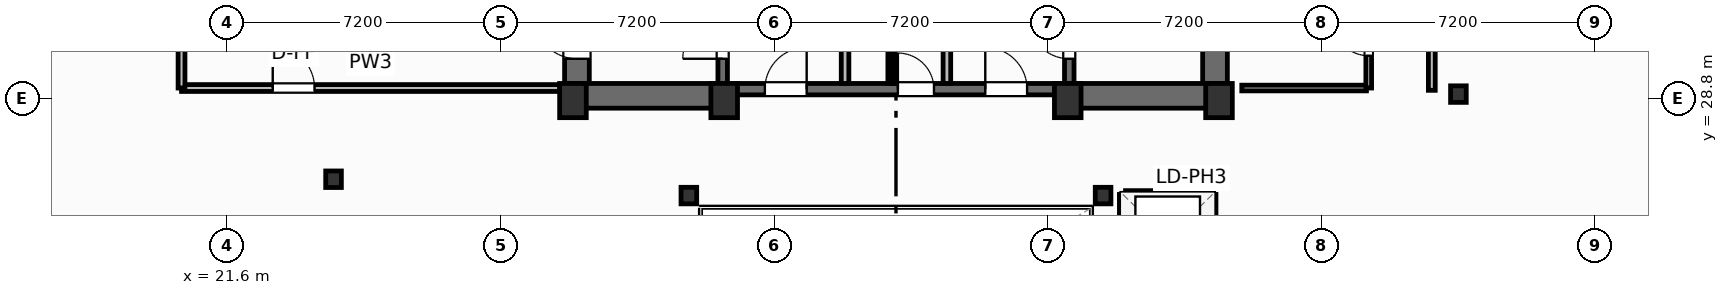
"""IFC4 building model, lengths in metres.
Left out: names, types, materials, properties, quantities, classifications, styles, units other than length and angle.
Written with IfcOpenShell. Run it as: python <this file> out.ifc"""

import sys

from ifc_helpers import new_model, si_unit, direction, frame, frame_2d, origin, origin_2d, place, context, subcontext, project, spatial, rectangle, i_section, extrude, element, fill, save


model = new_model("IFC4")
c1 = context("Model", 3, precision=1e-05, world=origin(), true_north=direction((0.0, 1.0)))
c2 = subcontext(c1, "Body", "Model", "MODEL_VIEW")
j1 = project(units=[si_unit("LENGTHUNIT", "METRE"), si_unit("PLANEANGLEUNIT", "RADIAN")], contexts=[c1])
p1 = place(None, origin())
s1 = spatial("IfcSite", under=j1, at=p1, CompositionType="ELEMENT")
p2 = place(p1, origin())
s2 = spatial("IfcBuilding", under=s1, at=p2, CompositionType="ELEMENT")
p3 = place(p2, frame((0.0, 0.0, 253.4)))
s3 = spatial("IfcBuildingStorey", under=s2, at=p3, CompositionType="ELEMENT", Elevation=253.4)
for number, where, z_axis, x_axis in (
    (1, (30.7, 28.75, 0.0), (0.0, 0.0, 1.0), (1.0, 0.0, 0.0)),
    (2, (34.68, 28.75, 0.0), (0.0, 0.0, 1.0), (1.0, 0.0, 0.0)),
    (3, (43.72, 28.75, 0.0), (0.0, 0.0, 1.0), (1.0, 0.0, 0.0)),
    (4, (47.7, 28.75, 0.0), (0.0, 0.0, 1.0), (1.0, 0.0, 0.0)),
):
    element("IfcColumn", number, at=place(p3, frame(where, z_axis=z_axis, x_axis=x_axis)), inside=s3, PredefinedType="COLUMN", context=c2, shape_type="SweptSolid", body=[
        extrude(rectangle(XDim=0.7, YDim=0.9, at=origin_2d()), origin(), (0.0, 0.0, 1.0), 4.8),
    ])
for number, where, z_axis, x_axis in (
    (5, (33.75, 26.25, 0.0), (0.0, 0.0, 1.0), (1.0, 0.0, 0.0)),
    (6, (44.65, 26.25, 0.0), (0.0, 0.0, 1.0), (1.0, 0.0, 0.0)),
    (7, (24.4, 26.68, 0.0), (0.0, 0.0, 1.0), (1.0, 0.0, 0.0)),
    (8, (54.0, 28.92, 0.0), (0.0, 0.0, 1.0), (1.0, 0.0, 0.0)),
):
    element("IfcColumn", number, at=place(p3, frame(where, z_axis=z_axis, x_axis=x_axis)), inside=s3, PredefinedType="COLUMN", context=c2, shape_type="SweptSolid", body=[
        extrude(i_section(OverallWidth=0.412, OverallDepth=0.435, WebThickness=0.036, FlangeThickness=0.057, FilletRadius=0.025, at=origin_2d()), origin(), (0.0, 0.0, 1.0), 4.8),
    ])
p4 = place(p3, frame((30.805, 29.2, 0.0), z_axis=(0.0, 0.0, 1.0), x_axis=(0.0, 1.0, 0.0)))
e9 = element("IfcWall", 9, at=p4, inside=s3, PredefinedType="SHEAR", context=c2, shape_type="SweptSolid", body=[
    extrude(rectangle(XDim=9.22, YDim=0.65, at=frame_2d((4.61, 0.0))), origin(), (0.0, 0.0, 1.0), 4.55),
])
p5 = place(p4, frame((0.65, 0.0, 0.0)))
e10 = element("IfcOpeningElement", 10, at=p5, cuts=e9, PredefinedType="OPENING", context=c2, shape_type="SweptSolid", body=[
    extrude(rectangle(XDim=1.1, YDim=2.15, at=frame_2d((0.55, 1.075))), frame((0.0, 0.335, 0.0), z_axis=(0.0, -1.0, 0.0), x_axis=(1.0, 0.0, 0.0)), (0.0, 0.0, 1.0), 0.67),
])
p6 = place(p3, frame((47.595, 29.2, 0.0), z_axis=(0.0, 0.0, 1.0), x_axis=(0.0, 1.0, 0.0)))
e11 = element("IfcWall", 11, at=p6, inside=s3, PredefinedType="SHEAR", context=c2, shape_type="SweptSolid", body=[
    extrude(rectangle(XDim=9.22, YDim=0.65, at=frame_2d((4.61, 0.0))), origin(), (0.0, 0.0, 1.0), 4.55),
])
p7 = place(p3, frame((30.48, 28.875, 0.0), z_axis=(0.0, 0.0, 1.0), x_axis=(1.0, 0.0, 0.0)))
e12 = element("IfcWall", 12, at=p7, inside=s3, PredefinedType="SHEAR", context=c2, shape_type="SweptSolid", body=[
    extrude(rectangle(XDim=4.32, YDim=0.65, at=frame_2d((2.16, 0.0))), origin(), (0.0, 0.0, 1.0), 4.55),
])
p8 = place(p3, frame((43.6, 28.875, 0.0), z_axis=(0.0, 0.0, 1.0), x_axis=(1.0, 0.0, 0.0)))
e13 = element("IfcWall", 13, at=p8, inside=s3, PredefinedType="SHEAR", context=c2, shape_type="SweptSolid", body=[
    extrude(rectangle(XDim=4.32, YDim=0.65, at=frame_2d((2.16, 0.0))), origin(), (0.0, 0.0, 1.0), 4.55),
])
p9 = place(p3, frame((34.8, 29.05, 0.0), z_axis=(0.0, 0.0, 1.0), x_axis=(1.0, 0.0, 0.0)))
e14 = element("IfcWall", 14, at=p9, inside=s3, PredefinedType="SHEAR", context=c2, shape_type="SweptSolid", body=[
    extrude(rectangle(XDim=8.8, YDim=0.3, at=frame_2d((4.4, 0.0))), origin(), (0.0, 0.0, 1.0), 4.55),
])
p10 = place(p9, frame((0.95, 0.0, 0.0)))
e15 = element("IfcOpeningElement", 15, at=p10, cuts=e14, PredefinedType="OPENING", context=c2, shape_type="SweptSolid", body=[
    extrude(rectangle(XDim=1.1, YDim=2.15, at=frame_2d((0.55, 1.075))), frame((0.0, 0.16, 0.0), z_axis=(0.0, -1.0, 0.0), x_axis=(1.0, 0.0, 0.0)), (0.0, 0.0, 1.0), 0.32),
])
p11 = place(p9, frame((6.75, 0.0, 0.0)))
e16 = element("IfcOpeningElement", 16, at=p11, cuts=e14, PredefinedType="OPENING", context=c2, shape_type="SweptSolid", body=[
    extrude(rectangle(XDim=1.1, YDim=2.15, at=frame_2d((0.55, 1.075))), frame((0.0, 0.16, 0.0), z_axis=(0.0, -1.0, 0.0), x_axis=(1.0, 0.0, 0.0)), (0.0, 0.0, 1.0), 0.32),
])
p12 = place(p9, frame((4.45, 0.0, 0.0)))
e17 = element("IfcOpeningElement", 17, at=p12, cuts=e14, PredefinedType="OPENING", context=c2, shape_type="SweptSolid", body=[
    extrude(rectangle(XDim=0.95, YDim=2.15, at=frame_2d((0.475, 1.075))), frame((0.0, 0.16, 0.0), z_axis=(0.0, -1.0, 0.0), x_axis=(1.0, 0.0, 0.0)), (0.0, 0.0, 1.0), 0.32),
])
p13 = place(p3, frame((34.64, 29.2, 0.0), z_axis=(0.0, 0.0, 1.0), x_axis=(0.0, 1.0, 0.0)))
e18 = element("IfcWall", 18, at=p13, inside=s3, PredefinedType="SHEAR", context=c2, shape_type="SweptSolid", body=[
    extrude(rectangle(XDim=9.22, YDim=0.25, at=frame_2d((4.61, 0.0))), origin(), (0.0, 0.0, 1.0), 4.55),
])
p14 = place(p13, frame((0.65, 0.0, 0.0)))
e19 = element("IfcOpeningElement", 19, at=p14, cuts=e18, PredefinedType="OPENING", context=c2, shape_type="SweptSolid", body=[
    extrude(rectangle(XDim=1.05, YDim=2.15, at=frame_2d((0.525, 1.075))), frame((0.0, 0.135, 0.0), z_axis=(0.0, -1.0, 0.0), x_axis=(1.0, 0.0, 0.0)), (0.0, 0.0, 1.0), 0.27),
])
p15 = place(p3, frame((43.76, 29.2, 0.0), z_axis=(0.0, 0.0, 1.0), x_axis=(0.0, 1.0, 0.0)))
e20 = element("IfcWall", 20, at=p15, inside=s3, PredefinedType="SHEAR", context=c2, shape_type="SweptSolid", body=[
    extrude(rectangle(XDim=9.22, YDim=0.25, at=frame_2d((4.61, 0.0))), origin(), (0.0, 0.0, 1.0), 4.55),
])
p16 = place(p15, frame((0.65, 0.0, 0.0)))
e21 = element("IfcOpeningElement", 21, at=p16, cuts=e20, PredefinedType="OPENING", context=c2, shape_type="SweptSolid", body=[
    extrude(rectangle(XDim=1.05, YDim=2.15, at=frame_2d((0.525, 1.075))), frame((0.0, 0.135, 0.0), z_axis=(0.0, -1.0, 0.0), x_axis=(1.0, 0.0, 0.0)), (0.0, 0.0, 1.0), 0.27),
])
p17 = place(p3, frame((7.331, 25.557, 0.0), z_axis=(0.0, 0.0, 1.0), x_axis=(0.823530664362, 0.567271755735, 0.0)))
e22 = element("IfcWall", 22, at=p17, inside=s3, PredefinedType="SOLIDWALL", context=c2, shape_type="SweptSolid", body=[
    extrude(rectangle(XDim=52.2, YDim=0.22, at=frame_2d((26.1, 0.0))), origin(), (0.0, 0.0, 1.0), 3.83),
])
p18 = place(p17, frame((28.025, 0.0, 0.0)))
e23 = element("IfcOpeningElement", 23, at=p18, cuts=e22, PredefinedType="OPENING", context=c2, shape_type="SweptSolid", body=[
    extrude(rectangle(XDim=1.85, YDim=2.3, at=frame_2d((0.925, 1.15))), frame((0.0, 0.12, 0.0), z_axis=(0.0, -1.0, 0.0), x_axis=(1.0, 0.0, 0.0)), (0.0, 0.0, 1.0), 0.24),
])
p19 = place(p17, frame((0.55, 0.0, 0.75)))
e24 = element("IfcOpeningElement", 24, at=p19, cuts=e22, PredefinedType="OPENING", context=c2, shape_type="SweptSolid", body=[
    extrude(rectangle(XDim=1.85, YDim=1.75, at=frame_2d((0.925, 0.875))), frame((0.0, 0.12, 0.0), z_axis=(0.0, -1.0, 0.0), x_axis=(1.0, 0.0, 0.0)), (0.0, 0.0, 1.0), 0.24),
])
p20 = place(p17, frame((49.8, 0.0, 0.75)))
e25 = element("IfcOpeningElement", 25, at=p20, cuts=e22, PredefinedType="OPENING", context=c2, shape_type="SweptSolid", body=[
    extrude(rectangle(XDim=1.85, YDim=1.75, at=frame_2d((0.925, 0.875))), frame((0.0, 0.12, 0.0), z_axis=(0.0, -1.0, 0.0), x_axis=(1.0, 0.0, 0.0)), (0.0, 0.0, 1.0), 0.24),
])
p21 = place(p3, frame((20.4, 29.08, 0.0), z_axis=(0.0, 0.0, 1.0), x_axis=(1.0, 0.0, 0.0)))
e26 = element("IfcWall", 26, at=p21, inside=s3, PredefinedType="PARTITIONING", context=c2, shape_type="SweptSolid", body=[
    extrude(rectangle(XDim=9.95, YDim=0.18, at=frame_2d((4.975, 0.0))), origin(), (0.0, 0.0, 1.0), 4.55),
])
p22 = place(p21, frame((2.4, 0.0, 0.0)))
e27 = element("IfcOpeningElement", 27, at=p22, cuts=e26, PredefinedType="OPENING", context=c2, shape_type="SweptSolid", body=[
    extrude(rectangle(XDim=1.1, YDim=2.15, at=frame_2d((0.55, 1.075))), frame((0.0, 0.1, 0.0), z_axis=(0.0, -1.0, 0.0), x_axis=(1.0, 0.0, 0.0)), (0.0, 0.0, 1.0), 0.2),
])
p23 = place(p3, frame((20.4, 29.08, 0.0), z_axis=(0.0, 0.0, 1.0), x_axis=(0.0, 1.0, 0.0)))
e28 = element("IfcWall", 28, at=p23, inside=s3, PredefinedType="PARTITIONING", context=c2, shape_type="SweptSolid", body=[
    extrude(rectangle(XDim=5.443, YDim=0.18, at=frame_2d((2.721, 0.0))), origin(), (0.0, 0.0, 1.0), 4.55),
])
p24 = place(p3, frame((53.3, 29.02, 0.0), z_axis=(0.0, 0.0, 1.0), x_axis=(0.0, 1.0, 0.0)))
e29 = element("IfcWall", 29, at=p24, inside=s3, PredefinedType="PARTITIONING", context=c2, shape_type="SweptSolid", body=[
    extrude(rectangle(XDim=10.28, YDim=0.18, at=frame_2d((5.14, 0.0))), origin(), (0.0, 0.0, 1.0), 4.55),
])
for number, where, z_axis, x_axis in (
    (30, (37.86, 29.2, 0.0), (0.0, 0.0, 1.0), (0.0, 1.0, 0.0)),
    (31, (40.54, 29.2, 0.0), (0.0, 0.0, 1.0), (0.0, 1.0, 0.0)),
):
    element("IfcWall", number, at=place(p3, frame(where, z_axis=z_axis, x_axis=x_axis)), inside=s3, PredefinedType="PARTITIONING", context=c2, shape_type="SweptSolid", body=[
        extrude(rectangle(XDim=5.18, YDim=0.2, at=frame_2d((2.59, 0.0))), origin(), (0.0, 0.0, 1.0), 4.55),
    ])
p25 = place(p3, frame((39.05, 29.2, 0.0), z_axis=(0.0, 0.0, 1.0), x_axis=(0.0, 1.0, 0.0)))
e32 = element("IfcWall", 32, at=p25, inside=s3, PredefinedType="PARTITIONING", context=c2, shape_type="SweptSolid", body=[
    extrude(rectangle(XDim=5.22, YDim=0.125, at=frame_2d((2.61, 0.0))), origin(), (0.0, 0.0, 1.0), 4.55),
])
p26 = place(p25, frame((2.05, 0.0, 0.0)))
e33 = element("IfcOpeningElement", 33, at=p26, cuts=e32, PredefinedType="OPENING", context=c2, shape_type="SweptSolid", body=[
    extrude(rectangle(XDim=0.85, YDim=2.05, at=frame_2d((0.425, 1.025))), frame((0.0, 0.073, 0.0), z_axis=(0.0, -1.0, 0.0), x_axis=(1.0, 0.0, 0.0)), (0.0, 0.0, 1.0), 0.145),
])
p27 = place(p3, frame((48.3, 29.08, 0.0), z_axis=(0.0, 0.0, 1.0), x_axis=(1.0, 0.0, 0.0)))
e34 = element("IfcWall", 34, at=p27, inside=s3, PredefinedType="PARTITIONING", context=c2, shape_type="SweptSolid", body=[
    extrude(rectangle(XDim=3.28, YDim=0.15, at=frame_2d((1.64, 0.0))), origin(), (0.0, 0.0, 1.0), 3.762),
])
p28 = place(p3, frame((51.64, 29.08, 0.0), z_axis=(0.0, 0.0, 1.0), x_axis=(0.0, 1.0, 0.0)))
e35 = element("IfcWall", 35, at=p28, inside=s3, PredefinedType="PARTITIONING", context=c2, shape_type="SweptSolid", body=[
    extrude(rectangle(XDim=6.88, YDim=0.15, at=frame_2d((3.44, 0.0))), origin(), (0.0, 0.0, 1.0), 4.55),
])
p29 = place(p28, frame((0.85, 0.0, 0.0)))
e36 = element("IfcOpeningElement", 36, at=p29, cuts=e35, PredefinedType="OPENING", context=c2, shape_type="SweptSolid", body=[
    extrude(rectangle(XDim=0.95, YDim=2.05, at=frame_2d((0.475, 1.025))), frame((0.0, 0.085, 0.0), z_axis=(0.0, -1.0, 0.0), x_axis=(1.0, 0.0, 0.0)), (0.0, 0.0, 1.0), 0.17),
])
p30 = place(p3, frame((45.24, 26.28, 0.0), z_axis=(0.0, 0.0, 1.0), x_axis=(1.0, 0.0, 0.0)))
e37 = element("IfcWall", 37, at=p30, inside=s3, PredefinedType="PARTITIONING", context=c2, shape_type="SweptSolid", body=[
    extrude(rectangle(XDim=2.22, YDim=0.2, at=frame_2d((1.11, 0.0))), origin(), (0.0, 0.0, 1.0), 4.55),
])
p31 = place(p3, frame((45.18, 19.38, 0.0), z_axis=(0.0, 0.0, 1.0), x_axis=(0.0, 1.0, 0.0)))
e38 = element("IfcWall", 38, at=p31, inside=s3, PredefinedType="PARTITIONING", context=c2, shape_type="SweptSolid", body=[
    extrude(rectangle(XDim=6.9, YDim=0.2, at=frame_2d((3.45, 0.0))), origin(), (0.0, 0.0, 1.0), 4.55),
])
p32 = place(p3, frame((47.52, 19.38, 0.0), z_axis=(0.0, 0.0, 1.0), x_axis=(0.0, 1.0, 0.0)))
e39 = element("IfcWall", 39, at=p32, inside=s3, PredefinedType="PARTITIONING", context=c2, shape_type="SweptSolid", body=[
    extrude(rectangle(XDim=6.9, YDim=0.2, at=frame_2d((3.45, 0.0))), origin(), (0.0, 0.0, 1.0), 4.55),
])
p33 = place(p32, frame((0.59, 0.0, 0.0)))
e40 = element("IfcOpeningElement", 40, at=p33, cuts=e39, PredefinedType="OPENING", context=c2, shape_type="SweptSolid", body=[
    extrude(rectangle(XDim=1.1, YDim=2.15, at=frame_2d((0.55, 1.075))), frame((0.0, 0.11, 0.0), z_axis=(0.0, -1.0, 0.0), x_axis=(1.0, 0.0, 0.0)), (0.0, 0.0, 1.0), 0.22),
])
p34 = place(p32, frame((2.89, 0.0, 0.0)))
e41 = element("IfcOpeningElement", 41, at=p34, cuts=e39, PredefinedType="OPENING", context=c2, shape_type="SweptSolid", body=[
    extrude(rectangle(XDim=1.1, YDim=2.15, at=frame_2d((0.55, 1.075))), frame((0.0, 0.11, 0.0), z_axis=(0.0, -1.0, 0.0), x_axis=(1.0, 0.0, 0.0)), (0.0, 0.0, 1.0), 0.22),
])
p35 = place(p32, frame((5.19, 0.0, 0.0)))
e42 = element("IfcOpeningElement", 42, at=p35, cuts=e39, PredefinedType="OPENING", context=c2, shape_type="SweptSolid", body=[
    extrude(rectangle(XDim=1.1, YDim=2.15, at=frame_2d((0.55, 1.075))), frame((0.0, 0.11, 0.0), z_axis=(0.0, -1.0, 0.0), x_axis=(1.0, 0.0, 0.0)), (0.0, 0.0, 1.0), 0.22),
])
p36 = place(p5, origin())
e43 = element("IfcDoor", 43, at=p36, inside=s3, OperationType="SINGLE_SWING_RIGHT", PredefinedType="DOOR", context=c2, shape_type="SweptSolid", body=[
    extrude(rectangle(XDim=1.1, YDim=2.15, at=frame_2d((0.55, 1.075))), frame((0.0, 0.025, 0.0), z_axis=(0.0, -1.0, 0.0), x_axis=(1.0, 0.0, 0.0)), (0.0, 0.0, 1.0), 0.05),
])
fill(e10, e43)
p37 = place(p22, origin())
e44 = element("IfcDoor", 44, at=p37, inside=s3, OperationType="SINGLE_SWING_LEFT", PredefinedType="DOOR", context=c2, shape_type="SweptSolid", body=[
    extrude(rectangle(XDim=1.1, YDim=2.15, at=frame_2d((0.55, 1.075))), frame((0.0, 0.025, 0.0), z_axis=(0.0, -1.0, 0.0), x_axis=(1.0, 0.0, 0.0)), (0.0, 0.0, 1.0), 0.05),
])
fill(e27, e44)
p38 = place(p14, origin())
e45 = element("IfcDoor", 45, at=p38, inside=s3, OperationType="SINGLE_SWING_LEFT", PredefinedType="DOOR", context=c2, shape_type="SweptSolid", body=[
    extrude(rectangle(XDim=1.05, YDim=2.15, at=frame_2d((0.525, 1.075))), frame((0.0, 0.025, 0.0), z_axis=(0.0, -1.0, 0.0), x_axis=(1.0, 0.0, 0.0)), (0.0, 0.0, 1.0), 0.05),
])
fill(e19, e45)
p39 = place(p16, origin())
e46 = element("IfcDoor", 46, at=p39, inside=s3, OperationType="SINGLE_SWING_RIGHT", PredefinedType="DOOR", context=c2, shape_type="SweptSolid", body=[
    extrude(rectangle(XDim=1.05, YDim=2.15, at=frame_2d((0.525, 1.075))), frame((0.0, 0.025, 0.0), z_axis=(0.0, -1.0, 0.0), x_axis=(1.0, 0.0, 0.0)), (0.0, 0.0, 1.0), 0.05),
])
fill(e21, e46)
p40 = place(p10, origin())
e47 = element("IfcDoor", 47, at=p40, inside=s3, OperationType="SINGLE_SWING_RIGHT", PredefinedType="DOOR", context=c2, shape_type="SweptSolid", body=[
    extrude(rectangle(XDim=1.1, YDim=2.15, at=frame_2d((0.55, 1.075))), frame((0.0, 0.025, 0.0), z_axis=(0.0, -1.0, 0.0), x_axis=(1.0, 0.0, 0.0)), (0.0, 0.0, 1.0), 0.05),
])
fill(e15, e47)
p41 = place(p11, origin())
e48 = element("IfcDoor", 48, at=p41, inside=s3, OperationType="SINGLE_SWING_LEFT", PredefinedType="DOOR", context=c2, shape_type="SweptSolid", body=[
    extrude(rectangle(XDim=1.1, YDim=2.15, at=frame_2d((0.55, 1.075))), frame((0.0, 0.025, 0.0), z_axis=(0.0, -1.0, 0.0), x_axis=(1.0, 0.0, 0.0)), (0.0, 0.0, 1.0), 0.05),
])
fill(e16, e48)
p42 = place(p12, origin())
e49 = element("IfcDoor", 49, at=p42, inside=s3, OperationType="SINGLE_SWING_LEFT", PredefinedType="DOOR", context=c2, shape_type="SweptSolid", body=[
    extrude(rectangle(XDim=0.95, YDim=2.15, at=frame_2d((0.475, 1.075))), frame((0.0, 0.025, 0.0), z_axis=(0.0, -1.0, 0.0), x_axis=(1.0, 0.0, 0.0)), (0.0, 0.0, 1.0), 0.05),
])
fill(e17, e49)
p43 = place(p29, origin())
e50 = element("IfcDoor", 50, at=p43, inside=s3, OperationType="SINGLE_SWING_RIGHT", PredefinedType="DOOR", context=c2, shape_type="SweptSolid", body=[
    extrude(rectangle(XDim=0.95, YDim=2.05, at=frame_2d((0.475, 1.025))), frame((0.0, 0.025, 0.0), z_axis=(0.0, -1.0, 0.0), x_axis=(1.0, 0.0, 0.0)), (0.0, 0.0, 1.0), 0.05),
])
fill(e36, e50)
save(model, sys.argv[1])
